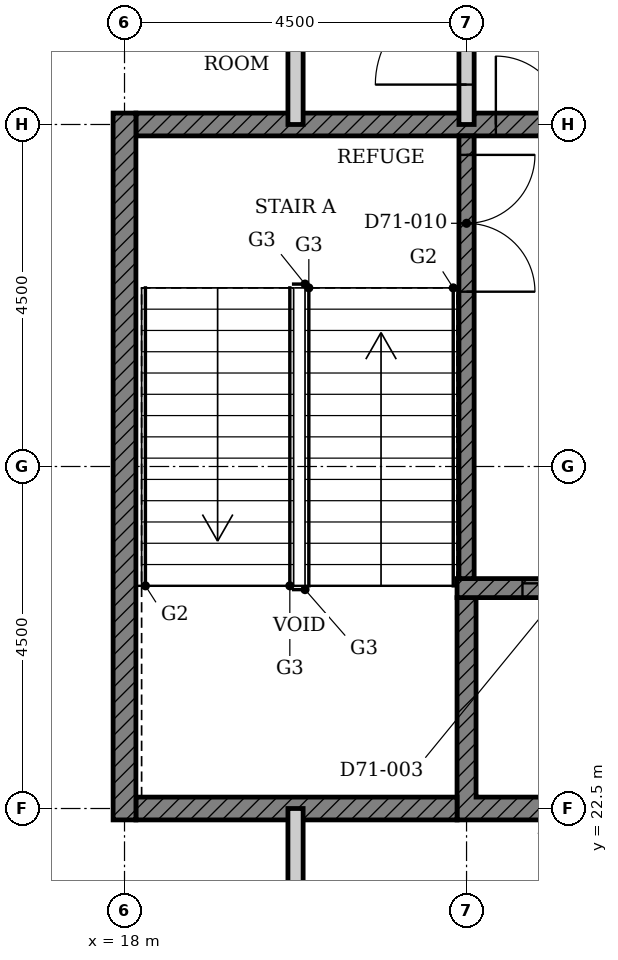
"""IFC4 building model, lengths in metres.
Left out: names, types, materials, properties, quantities, classifications, styles, units other than length and angle.
Written with IfcOpenShell. Run it as: python <this file> out.ifc"""

import sys

from ifc_helpers import new_model, si_unit, direction, frame, frame_2d, origin, place, context, subcontext, project, spatial, polyline, rectangle, outline, extrude, element, fill, save


model = new_model("IFC4")
c1 = context("Model", 3, precision=1e-05, world=origin(), true_north=direction((0.0, 1.0)))
c2 = subcontext(c1, "Body", "Model", "MODEL_VIEW")
j1 = project(units=[si_unit("LENGTHUNIT", "METRE"), si_unit("PLANEANGLEUNIT", "RADIAN")], contexts=[c1])
p1 = place(None, origin())
s1 = spatial("IfcSite", under=j1, at=p1, CompositionType="ELEMENT")
p2 = place(p1, origin())
s2 = spatial("IfcBuilding", under=s1, at=p2, CompositionType="ELEMENT")
p3 = place(p2, frame((0.0, 0.0, 278.6)))
s3 = spatial("IfcBuildingStorey", under=s2, at=p3, CompositionType="ELEMENT", Elevation=278.6)
p4 = place(p3, origin())
e1 = element("IfcWall", 1, at=p4, inside=s3, PredefinedType="SHEAR", context=c2, shape_type="SweptSolid", body=[
    extrude(outline(polyline([(22.375, 22.35), (25.197, 22.35), (25.197, 25.275), (24.947, 25.275), (24.947, 22.65), (22.625, 22.65), (22.625, 25.275), (22.375, 25.275), (22.375, 22.35)])), origin(), (0.0, 0.0, 1.0), 4.5),
])
p5 = place(p3, frame((18.15, 22.5, 0.0), z_axis=(0.0, 0.0, 1.0), x_axis=(1.0, 0.0, 0.0)))
e2 = element("IfcWall", 2, at=p5, inside=s3, PredefinedType="SHEAR", context=c2, shape_type="SweptSolid", body=[
    extrude(rectangle(XDim=4.225, YDim=0.3, at=frame_2d((2.113, 0.0))), origin(), (0.0, 0.0, 1.0), 4.5),
])
p6 = place(p3, frame((18.15, 31.5, 0.0), z_axis=(0.0, 0.0, 1.0), x_axis=(1.0, 0.0, 0.0)))
e3 = element("IfcWall", 3, at=p6, inside=s3, PredefinedType="SHEAR", context=c2, shape_type="SweptSolid", body=[
    extrude(rectangle(XDim=9.368, YDim=0.3, at=frame_2d((4.684, 0.0))), origin(), (0.0, 0.0, 1.0), 4.5),
])
p7 = place(p6, frame((4.736, 0.0, 0.0)))
e4 = element("IfcOpeningElement", 4, at=p7, cuts=e3, PredefinedType="OPENING", context=c2, shape_type="SweptSolid", body=[
    extrude(rectangle(XDim=1.8, YDim=2.1, at=frame_2d((0.9, 1.05))), frame((0.0, 0.16, 0.0), z_axis=(0.0, -1.0, 0.0), x_axis=(1.0, 0.0, 0.0)), (0.0, 0.0, 1.0), 0.32),
])
p8 = place(p3, frame((18.0, 22.35, 0.0), z_axis=(0.0, 0.0, 1.0), x_axis=(0.0, 1.0, 0.0)))
e5 = element("IfcWall", 5, at=p8, inside=s3, PredefinedType="SHEAR", context=c2, shape_type="SweptSolid", body=[
    extrude(rectangle(XDim=9.3, YDim=0.3, at=frame_2d((4.65, 0.0))), origin(), (0.0, 0.0, 1.0), 4.5),
])
p9 = place(p3, frame((22.375, 25.4, 0.0), z_axis=(0.0, 0.0, 1.0), x_axis=(1.0, 0.0, 0.0)))
e6 = element("IfcWall", 6, at=p9, inside=s3, PredefinedType="SHEAR", context=c2, shape_type="SweptSolid", body=[
    extrude(rectangle(XDim=15.678, YDim=0.25, at=frame_2d((7.839, 0.0))), origin(), (0.0, 0.0, 1.0), 4.5),
])
p10 = place(p9, frame((6.004, 0.0, 0.0)))
e7 = element("IfcOpeningElement", 7, at=p10, cuts=e6, PredefinedType="OPENING", context=c2, shape_type="SweptSolid", body=[
    extrude(rectangle(XDim=1.1, YDim=2.1, at=frame_2d((0.55, 1.05))), frame((0.0, 0.135, 0.0), z_axis=(0.0, -1.0, 0.0), x_axis=(1.0, 0.0, 0.0)), (0.0, 0.0, 1.0), 0.27),
])
p11 = place(p9, frame((0.861, 0.0, 0.0)))
e8 = element("IfcOpeningElement", 8, at=p11, cuts=e6, PredefinedType="OPENING", context=c2, shape_type="SweptSolid", body=[
    extrude(rectangle(XDim=1.1, YDim=2.1, at=frame_2d((0.55, 1.05))), frame((0.0, 0.135, 0.0), z_axis=(0.0, -1.0, 0.0), x_axis=(1.0, 0.0, 0.0)), (0.0, 0.0, 1.0), 0.27),
])
p12 = place(p9, frame((3.532, 0.0, 0.0)))
e9 = element("IfcOpeningElement", 9, at=p12, cuts=e6, PredefinedType="OPENING", context=c2, shape_type="SweptSolid", body=[
    extrude(rectangle(XDim=0.9, YDim=2.1, at=frame_2d((0.45, 1.05))), frame((0.0, 0.135, 0.0), z_axis=(0.0, -1.0, 0.0), x_axis=(1.0, 0.0, 0.0)), (0.0, 0.0, 1.0), 0.27),
])
p13 = place(p9, frame((11.246, 0.0, 0.0)))
e10 = element("IfcOpeningElement", 10, at=p13, cuts=e6, PredefinedType="OPENING", context=c2, shape_type="SweptSolid", body=[
    extrude(rectangle(XDim=0.9, YDim=2.1, at=frame_2d((0.45, 1.05))), frame((0.0, 0.135, 0.0), z_axis=(0.0, -1.0, 0.0), x_axis=(1.0, 0.0, 0.0)), (0.0, 0.0, 1.0), 0.27),
])
p14 = place(p3, frame((22.5, 31.35, 0.0), z_axis=(0.0, 0.0, 1.0), x_axis=(0.0, -1.0, 0.0)))
e11 = element("IfcWall", 11, at=p14, inside=s3, PredefinedType="SHEAR", context=c2, shape_type="SweptSolid", body=[
    extrude(rectangle(XDim=5.825, YDim=0.2, at=frame_2d((2.913, 0.0))), origin(), (0.0, 0.0, 1.0), 4.5),
])
p15 = place(p14, frame((0.25, 0.0, 0.0)))
e12 = element("IfcOpeningElement", 12, at=p15, cuts=e11, PredefinedType="OPENING", context=c2, shape_type="SweptSolid", body=[
    extrude(rectangle(XDim=1.8, YDim=2.1, at=frame_2d((0.9, 1.05))), frame((0.0, 0.11, 0.0), z_axis=(0.0, -1.0, 0.0), x_axis=(1.0, 0.0, 0.0)), (0.0, 0.0, 1.0), 0.22),
])
for number, where, z_axis, x_axis in (
    (13, (20.25, 20.25, 0.0), (0.0, 0.0, 1.0), (0.0, 1.0, 0.0)),
    (14, (20.25, 31.5, 0.0), (0.0, 0.0, 1.0), (0.0, 1.0, 0.0)),
):
    element("IfcWall", number, at=place(p3, frame(where, z_axis=z_axis, x_axis=x_axis)), inside=s3, PredefinedType="PARTITIONING", context=c2, shape_type="SweptSolid", body=[
        extrude(rectangle(XDim=2.25, YDim=0.2, at=frame_2d((1.125, 0.0))), origin(), (0.0, 0.0, 1.0), 4.5),
    ])
p16 = place(p3, frame((22.5, 31.5, 0.0), z_axis=(0.0, 0.0, 1.0), x_axis=(0.0, 1.0, 0.0)))
e15 = element("IfcWall", 15, at=p16, inside=s3, PredefinedType="PARTITIONING", context=c2, shape_type="SweptSolid", body=[
    extrude(rectangle(XDim=2.25, YDim=0.2, at=frame_2d((1.125, 0.0))), origin(), (0.0, 0.0, 1.0), 4.5),
])
p17 = place(p16, frame((0.525, 0.0, 0.0)))
e16 = element("IfcOpeningElement", 16, at=p17, cuts=e15, PredefinedType="OPENING", context=c2, shape_type="SweptSolid", body=[
    extrude(rectangle(XDim=1.2, YDim=2.1, at=frame_2d((0.6, 1.05))), frame((0.0, 0.11, 0.0), z_axis=(0.0, -1.0, 0.0), x_axis=(1.0, 0.0, 0.0)), (0.0, 0.0, 1.0), 0.22),
])
p18 = place(p11, origin())
e17 = element("IfcDoor", 17, at=p18, inside=s3, OperationType="DOUBLE_DOOR_SLIDING", PredefinedType="DOOR", context=c2, shape_type="SweptSolid", body=[
    extrude(rectangle(XDim=1.1, YDim=2.1, at=frame_2d((0.55, 1.05))), frame((0.0, 0.025, 0.0), z_axis=(0.0, -1.0, 0.0), x_axis=(1.0, 0.0, 0.0)), (0.0, 0.0, 1.0), 0.05),
])
fill(e8, e17)
p19 = place(p15, origin())
e18 = element("IfcDoor", 18, at=p19, inside=s3, OperationType="DOUBLE_DOOR_SINGLE_SWING", PredefinedType="DOOR", context=c2, shape_type="SweptSolid", body=[
    extrude(rectangle(XDim=1.8, YDim=2.1, at=frame_2d((0.9, 1.05))), frame((0.0, 0.025, 0.0), z_axis=(0.0, -1.0, 0.0), x_axis=(1.0, 0.0, 0.0)), (0.0, 0.0, 1.0), 0.05),
])
fill(e12, e18)
p20 = place(p7, origin())
e19 = element("IfcDoor", 19, at=p20, inside=s3, OperationType="DOUBLE_DOOR_SINGLE_SWING", PredefinedType="DOOR", context=c2, shape_type="SweptSolid", body=[
    extrude(rectangle(XDim=1.8, YDim=2.1, at=frame_2d((0.9, 1.05))), frame((0.0, 0.025, 0.0), z_axis=(0.0, -1.0, 0.0), x_axis=(1.0, 0.0, 0.0)), (0.0, 0.0, 1.0), 0.05),
])
fill(e4, e19)
p21 = place(p17, origin())
e20 = element("IfcDoor", 20, at=p21, inside=s3, OperationType="SINGLE_SWING_RIGHT", PredefinedType="DOOR", context=c2, shape_type="SweptSolid", body=[
    extrude(rectangle(XDim=1.2, YDim=2.1, at=frame_2d((0.6, 1.05))), frame((0.0, 0.025, 0.0), z_axis=(0.0, -1.0, 0.0), x_axis=(1.0, 0.0, 0.0)), (0.0, 0.0, 1.0), 0.05),
])
fill(e16, e20)
save(model, sys.argv[1])
